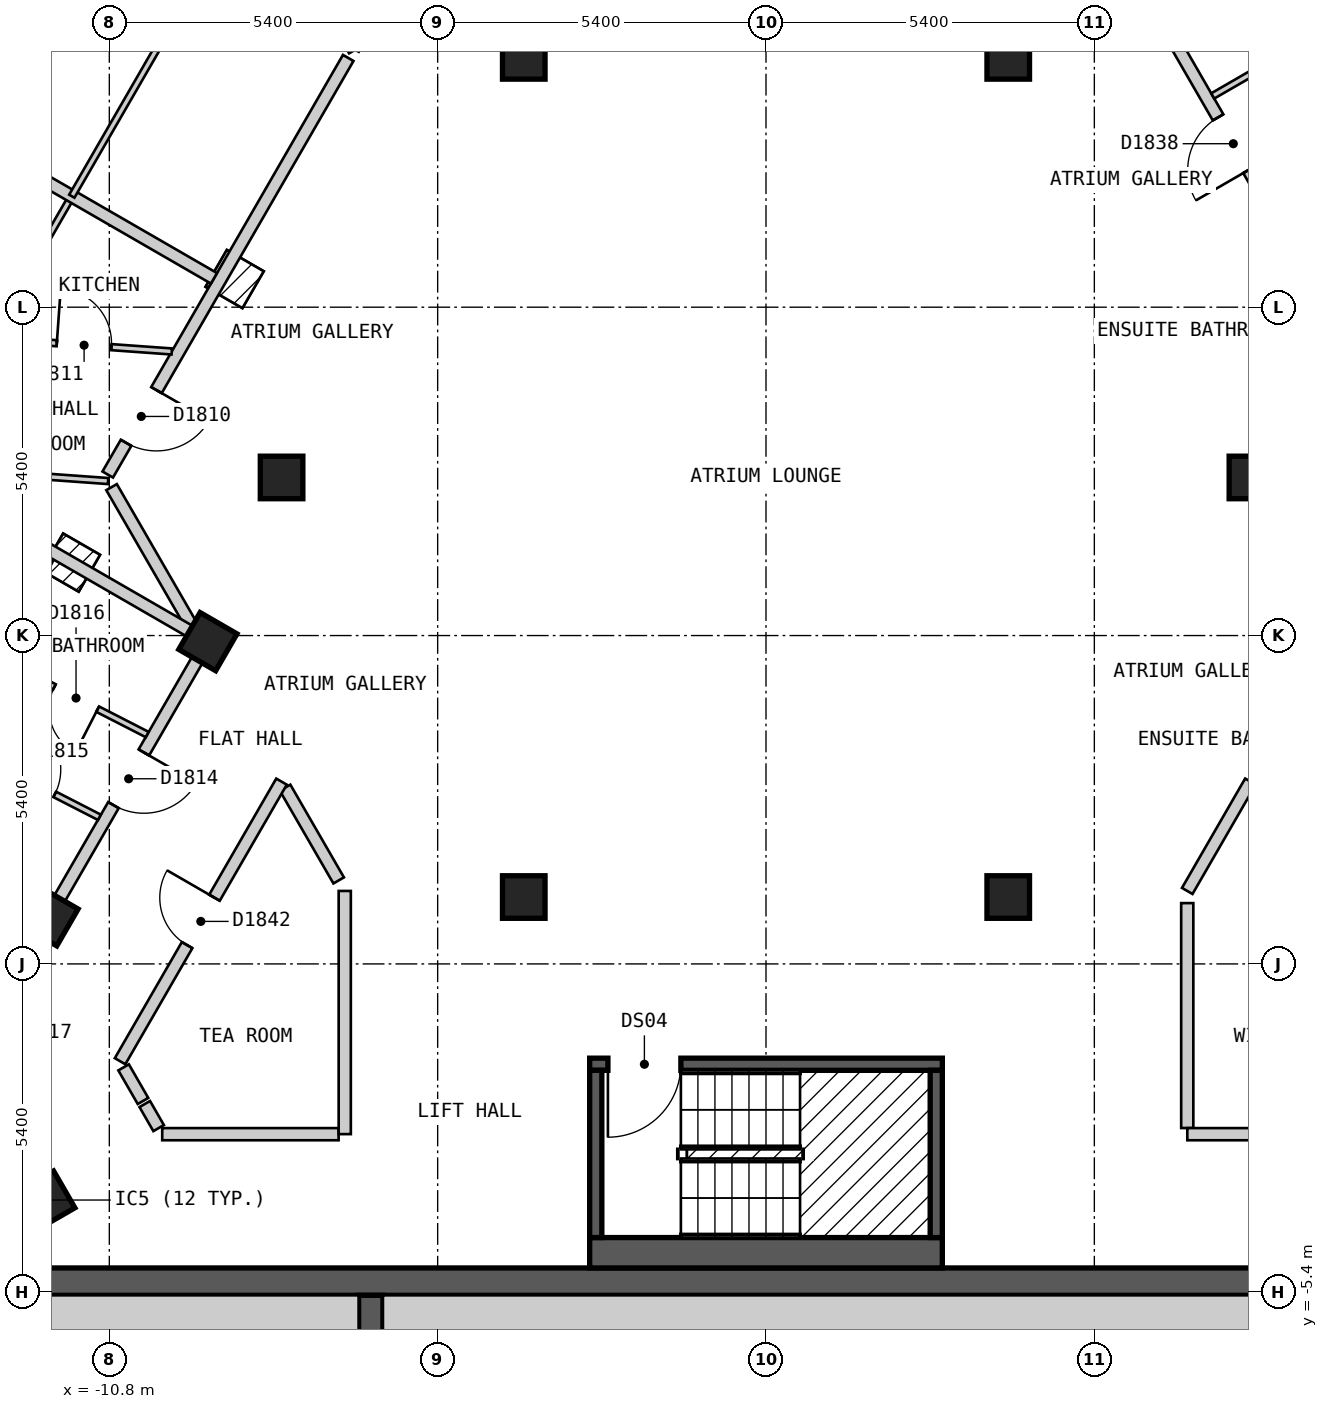
"""IFC4 building model, lengths in metres.
Left out: names, types, materials, properties, quantities, classifications, styles, units other than length and angle.
Written with IfcOpenShell. Run it as: python <this file> out.ifc"""

import sys

from ifc_helpers import new_model, si_unit, direction, frame, frame_2d, origin, origin_2d, place, context, subcontext, project, spatial, rectangle, extrude, element, fill, save


model = new_model("IFC4")
c1 = context("Model", 3, precision=1e-05, world=origin(), true_north=direction((0.0, 1.0)))
c2 = subcontext(c1, "Body", "Model", "MODEL_VIEW")
j1 = project(units=[si_unit("LENGTHUNIT", "METRE"), si_unit("PLANEANGLEUNIT", "RADIAN")], contexts=[c1])
p1 = place(None, origin())
s1 = spatial("IfcSite", under=j1, at=p1, CompositionType="ELEMENT")
p2 = place(p1, origin())
s2 = spatial("IfcBuilding", under=s1, at=p2, CompositionType="ELEMENT")
p3 = place(p2, frame((0.0, 0.0, 202.8)))
s3 = spatial("IfcBuildingStorey", under=s2, at=p3, CompositionType="ELEMENT", Elevation=202.8)
for number, where, z_axis, x_axis in (
    (1, (-11.845, -3.883, 0.0), (0.0, 0.0, 1.0), (0.5, -0.866, 0.0)),
    (2, (3.984, 1.1, 0.0), (0.0, 0.0, 1.0), (1.0, 0.0, 0.0)),
    (3, (7.967, 8.0, 0.0), (0.0, 0.0, 1.0), (1.0, 0.0, 0.0)),
    (4, (3.984, 14.9, 0.0), (0.0, 0.0, 1.0), (1.0, 0.0, 0.0)),
    (5, (-3.984, 14.9, 0.0), (0.0, 0.0, 1.0), (1.0, 0.0, 0.0)),
    (6, (-7.967, 8.0, 0.0), (0.0, 0.0, 1.0), (1.0, 0.0, 0.0)),
    (7, (-9.179, 5.3, 0.0), (0.0, 0.0, 1.0), (-0.5, -0.866, 0.0)),
    (8, (-3.984, 1.1, 0.0), (0.0, 0.0, 1.0), (1.0, 0.0, 0.0)),
    (9, (-11.792, 0.775, 0.0), (0.0, 0.0, 1.0), (-0.5, -0.866, 0.0)),
):
    element("IfcColumn", number, at=place(p3, frame(where, z_axis=z_axis, x_axis=x_axis)), inside=s3, PredefinedType="COLUMN", context=c2, shape_type="SweptSolid", body=[
        extrude(rectangle(XDim=0.7, YDim=0.7, at=origin_2d()), origin(), (0.0, 0.0, 1.0), 3.0),
    ])
p4 = place(p3, frame((-13.3, -5.225, 0.0), z_axis=(0.0, 0.0, 1.0), x_axis=(1.0, 0.0, 0.0)))
e10 = element("IfcWall", 10, at=p4, inside=s3, PredefinedType="SHEAR", context=c2, shape_type="SweptSolid", body=[
    extrude(rectangle(XDim=26.6, YDim=0.45, at=frame_2d((13.3, 0.0))), origin(), (0.0, 0.0, 1.0), 2.7),
])
p5 = place(p4, frame((23.65, 0.0, 0.0)))
e11 = element("IfcOpeningElement", 11, at=p5, cuts=e10, PredefinedType="OPENING", context=c2, shape_type="SweptSolid", body=[
    extrude(rectangle(XDim=1.2, YDim=2.1, at=frame_2d((0.6, 1.05))), frame((0.0, 0.235, 0.0), z_axis=(0.0, -1.0, 0.0), x_axis=(1.0, 0.0, 0.0)), (0.0, 0.0, 1.0), 0.47),
])
p6 = place(p3, frame((-6.5, -9.15, 0.0), z_axis=(0.0, 0.0, 1.0), x_axis=(0.0, 1.0, 0.0)))
e12 = element("IfcWall", 12, at=p6, inside=s3, PredefinedType="SHEAR", context=c2, shape_type="SweptSolid", body=[
    extrude(rectangle(XDim=3.7, YDim=0.4, at=frame_2d((1.85, 0.0))), origin(), (0.0, 0.0, 1.0), 2.7),
])
p7 = place(p3, frame((-2.9, -4.75, 0.0), z_axis=(0.0, 0.0, 1.0), x_axis=(1.0, 0.0, 0.0)))
e13 = element("IfcWall", 13, at=p7, inside=s3, PredefinedType="SOLIDWALL", context=c2, shape_type="SweptSolid", body=[
    extrude(rectangle(XDim=5.8, YDim=0.5, at=frame_2d((2.9, 0.0))), origin(), (0.0, 0.0, 1.0), 2.7),
])
p8 = place(p3, frame((-2.9, -1.65, 0.0), z_axis=(0.0, 0.0, 1.0), x_axis=(1.0, 0.0, 0.0)))
e14 = element("IfcWall", 14, at=p8, inside=s3, PredefinedType="SOLIDWALL", context=c2, shape_type="SweptSolid", body=[
    extrude(rectangle(XDim=5.8, YDim=0.2, at=frame_2d((2.9, 0.0))), origin(), (0.0, 0.0, 1.0), 2.7),
])
p9 = place(p8, frame((0.3, 0.0, 0.0)))
e15 = element("IfcOpeningElement", 15, at=p9, cuts=e14, PredefinedType="OPENING", context=c2, shape_type="SweptSolid", body=[
    extrude(rectangle(XDim=1.2, YDim=2.1, at=frame_2d((0.6, 1.05))), frame((0.0, 0.11, 0.0), z_axis=(0.0, -1.0, 0.0), x_axis=(1.0, 0.0, 0.0)), (0.0, 0.0, 1.0), 0.22),
])
for number, where, z_axis, x_axis in (
    (16, (-2.8, -4.5, 0.0), (0.0, 0.0, 1.0), (0.0, 1.0, 0.0)),
    (17, (2.8, -4.5, 0.0), (0.0, 0.0, 1.0), (0.0, 1.0, 0.0)),
):
    element("IfcWall", number, at=place(p3, frame(where, z_axis=z_axis, x_axis=x_axis)), inside=s3, PredefinedType="SOLIDWALL", context=c2, shape_type="SweptSolid", body=[
        extrude(rectangle(XDim=2.75, YDim=0.2, at=frame_2d((1.375, 0.0))), origin(), (0.0, 0.0, 1.0), 2.7),
    ])
p10 = place(p3, frame((-10.763, 7.841, 0.0), z_axis=(0.0, 0.0, 1.0), x_axis=(0.499980792466, -0.866036492975, 0.0)))
e18 = element("IfcWall", 18, at=p10, inside=s3, PredefinedType="PARTITIONING", context=c2, shape_type="SweptSolid", body=[
    extrude(rectangle(XDim=2.618, YDim=0.2, at=frame_2d((1.309, 0.0))), origin(), (0.0, 0.0, 1.0), 2.7),
])
p11 = place(p3, frame((-7.909, 2.898, 0.0), z_axis=(0.0, 0.0, 1.0), x_axis=(0.50019444547, -0.865913111531, 0.0)))
e19 = element("IfcWall", 19, at=p11, inside=s3, PredefinedType="PARTITIONING", context=c2, shape_type="SweptSolid", body=[
    extrude(rectangle(XDim=1.761, YDim=0.2, at=frame_2d((0.88, 0.0))), origin(), (0.0, 0.0, 1.0), 2.7),
])
p12 = place(p3, frame((-10.565, -1.701, 0.0), z_axis=(0.0, 0.0, 1.0), x_axis=(0.499512735409, -0.866306543416, 0.0)))
e20 = element("IfcWall", 20, at=p12, inside=s3, PredefinedType="PARTITIONING", context=c2, shape_type="SweptSolid", body=[
    extrude(rectangle(XDim=0.638, YDim=0.2, at=frame_2d((0.319, 0.0))), origin(), (0.0, 0.0, 1.0), 2.7),
])
p13 = place(p3, frame((-10.217, -2.304, 0.0), z_axis=(0.0, 0.0, 1.0), x_axis=(0.499013081552, -0.866594452117, 0.0)))
e21 = element("IfcWall", 21, at=p13, inside=s3, PredefinedType="PARTITIONING", context=c2, shape_type="SweptSolid", body=[
    extrude(rectangle(XDim=0.457, YDim=0.2, at=frame_2d((0.229, 0.0))), origin(), (0.0, 0.0, 1.0), 2.7),
])
p14 = place(p3, frame((5.485, 17.3, 0.0), z_axis=(0.0, 0.0, 1.0), x_axis=(0.499943285704, -0.866058145322, 0.0)))
e22 = element("IfcWall", 22, at=p14, inside=s3, PredefinedType="PARTITIONING", context=c2, shape_type="SweptSolid", body=[
    extrude(rectangle(XDim=10.623, YDim=0.2, at=frame_2d((5.312, 0.0))), origin(), (0.0, 0.0, 1.0), 2.7),
])
p15 = place(p14, frame((3.901, 0.0, 0.0)))
e23 = element("IfcOpeningElement", 23, at=p15, cuts=e22, PredefinedType="OPENING", context=c2, shape_type="SweptSolid", body=[
    extrude(rectangle(XDim=1.0, YDim=2.1, at=frame_2d((0.5, 1.05))), frame((0.0, 0.11, 0.0), z_axis=(0.0, -1.0, 0.0), x_axis=(1.0, 0.0, 0.0)), (0.0, 0.0, 1.0), 0.22),
])
p16 = place(p3, frame((6.928, 1.0, 0.0), z_axis=(0.0, 0.0, 1.0), x_axis=(0.0, -1.0, 0.0)))
e24 = element("IfcWall", 24, at=p16, inside=s3, PredefinedType="PARTITIONING", context=c2, shape_type="SweptSolid", body=[
    extrude(rectangle(XDim=3.699, YDim=0.2, at=frame_2d((1.85, 0.0))), origin(), (0.0, 0.0, 1.0), 2.7),
])
p17 = place(p3, frame((-9.93, -2.8, 0.0), z_axis=(0.0, 0.0, 1.0), x_axis=(1.0, 0.0, 0.0)))
e25 = element("IfcWall", 25, at=p17, inside=s3, PredefinedType="PARTITIONING", context=c2, shape_type="SweptSolid", body=[
    extrude(rectangle(XDim=2.901, YDim=0.2, at=frame_2d((1.45, 0.0))), origin(), (0.0, 0.0, 1.0), 2.7),
])
p18 = place(p3, frame((6.929, -2.8, 0.0), z_axis=(0.0, 0.0, 1.0), x_axis=(1.0, 0.0, 0.0)))
e26 = element("IfcWall", 26, at=p18, inside=s3, PredefinedType="PARTITIONING", context=c2, shape_type="SweptSolid", body=[
    extrude(rectangle(XDim=2.885, YDim=0.2, at=frame_2d((1.442, 0.0))), origin(), (0.0, 0.0, 1.0), 2.7),
])
p19 = place(p3, frame((6.928, 1.2, 0.0), z_axis=(0.0, 0.0, 1.0), x_axis=(0.500132712588, 0.865948768577, 0.0)))
e27 = element("IfcWall", 27, at=p19, inside=s3, PredefinedType="PARTITIONING", context=c2, shape_type="SweptSolid", body=[
    extrude(rectangle(XDim=2.078, YDim=0.2, at=frame_2d((1.039, 0.0))), origin(), (0.0, 0.0, 1.0), 2.7),
])
p20 = place(p3, frame((-10.623, -1.6, 0.0), z_axis=(0.0, 0.0, 1.0), x_axis=(0.500040865889, 0.866001808567, 0.0)))
e28 = element("IfcWall", 28, at=p20, inside=s3, PredefinedType="PARTITIONING", context=c2, shape_type="SweptSolid", body=[
    extrude(rectangle(XDim=5.31, YDim=0.2, at=frame_2d((2.655, 0.0))), origin(), (0.0, 0.0, 1.0), 2.7),
])
p21 = place(p20, frame((2.205, 0.0, 0.0)))
e29 = element("IfcOpeningElement", 29, at=p21, cuts=e28, PredefinedType="OPENING", context=c2, shape_type="SweptSolid", body=[
    extrude(rectangle(XDim=0.9, YDim=2.1, at=frame_2d((0.45, 1.05))), frame((0.0, 0.11, 0.0), z_axis=(0.0, -1.0, 0.0), x_axis=(1.0, 0.0, 0.0)), (0.0, 0.0, 1.0), 0.22),
])
p22 = place(p3, frame((-13.106, -1.5, 0.0), z_axis=(0.0, 0.0, 1.0), x_axis=(0.500025705601, 0.86601056214, 0.0)))
e30 = element("IfcWall", 30, at=p22, inside=s3, PredefinedType="PARTITIONING", context=c2, shape_type="SweptSolid", body=[
    extrude(rectangle(XDim=7.735, YDim=0.2, at=frame_2d((3.868, 0.0))), origin(), (0.0, 0.0, 1.0), 2.7),
])
p23 = place(p22, frame((4.748, 0.0, 0.0)))
e31 = element("IfcOpeningElement", 31, at=p23, cuts=e30, PredefinedType="OPENING", context=c2, shape_type="SweptSolid", body=[
    extrude(rectangle(XDim=1.0, YDim=2.1, at=frame_2d((0.5, 1.05))), frame((0.0, 0.11, 0.0), z_axis=(0.0, -1.0, 0.0), x_axis=(1.0, 0.0, 0.0)), (0.0, 0.0, 1.0), 0.22),
])
p24 = place(p22, frame((0.03, 0.0, 0.0)))
e32 = element("IfcOpeningElement", 32, at=p24, cuts=e30, PredefinedType="OPENING", context=c2, shape_type="SweptSolid", body=[
    extrude(rectangle(XDim=0.8, YDim=2.1, at=frame_2d((0.4, 1.05))), frame((0.0, 0.11, 0.0), z_axis=(0.0, -1.0, 0.0), x_axis=(1.0, 0.0, 0.0)), (0.0, 0.0, 1.0), 0.22),
])
p25 = place(p3, frame((-10.826, 8.048, 0.0), z_axis=(0.0, 0.0, 1.0), x_axis=(0.499953104851, 0.866052477019, 0.0)))
e33 = element("IfcWall", 33, at=p25, inside=s3, PredefinedType="PARTITIONING", context=c2, shape_type="SweptSolid", body=[
    extrude(rectangle(XDim=7.91, YDim=0.2, at=frame_2d((3.955, 0.0))), origin(), (0.0, 0.0, 1.0), 2.7),
])
p26 = place(p25, frame((0.603, 0.0, 0.0)))
e34 = element("IfcOpeningElement", 34, at=p26, cuts=e33, PredefinedType="OPENING", context=c2, shape_type="SweptSolid", body=[
    extrude(rectangle(XDim=1.0, YDim=2.1, at=frame_2d((0.5, 1.05))), frame((0.0, 0.11, 0.0), z_axis=(0.0, -1.0, 0.0), x_axis=(1.0, 0.0, 0.0)), (0.0, 0.0, 1.0), 0.22),
])
p27 = place(p3, frame((-6.928, -2.799, 0.0), z_axis=(0.0, 0.0, 1.0), x_axis=(0.0, 1.0, 0.0)))
e35 = element("IfcWall", 35, at=p27, inside=s3, PredefinedType="PARTITIONING", context=c2, shape_type="SweptSolid", body=[
    extrude(rectangle(XDim=3.999, YDim=0.2, at=frame_2d((2.0, 0.0))), origin(), (0.0, 0.0, 1.0), 2.7),
])
p28 = place(p3, frame((-7.628, 16.412, 0.0), z_axis=(0.0, 0.0, 1.0), x_axis=(0.499843439945, -0.866115774908, 0.0)))
e36 = element("IfcWall", 36, at=p28, inside=s3, PredefinedType="PARTITIONING", context=c2, shape_type="SweptSolid", body=[
    extrude(rectangle(XDim=1.63, YDim=0.1, at=frame_2d((0.815, 0.0))), origin(), (0.0, 0.0, 1.0), 2.7),
])
p29 = place(p3, frame((-12.562, 4.995, 0.0), z_axis=(0.0, 0.0, 1.0), x_axis=(0.889807979554, -0.456335139478, 0.0)))
e37 = element("IfcWall", 37, at=p29, inside=s3, PredefinedType="PARTITIONING", context=c2, shape_type="SweptSolid", body=[
    extrude(rectangle(XDim=2.68, YDim=0.1, at=frame_2d((1.34, 0.0))), origin(), (0.0, 0.0, 1.0), 2.7),
])
p30 = place(p29, frame((0.965, 0.0, 0.0)))
e38 = element("IfcOpeningElement", 38, at=p30, cuts=e37, PredefinedType="OPENING", context=c2, shape_type="SweptSolid", body=[
    extrude(rectangle(XDim=0.8, YDim=2.1, at=frame_2d((0.4, 1.05))), frame((0.0, 0.06, 0.0), z_axis=(0.0, -1.0, 0.0), x_axis=(1.0, 0.0, 0.0)), (0.0, 0.0, 1.0), 0.12),
])
p31 = place(p3, frame((-13.277, 3.598, 0.0), z_axis=(0.0, 0.0, 1.0), x_axis=(0.889780322893, -0.456389063182, 0.0)))
e39 = element("IfcWall", 39, at=p31, inside=s3, PredefinedType="PARTITIONING", context=c2, shape_type="SweptSolid", body=[
    extrude(rectangle(XDim=2.601, YDim=0.1, at=frame_2d((1.3, 0.0))), origin(), (0.0, 0.0, 1.0), 2.7),
])
p32 = place(p31, frame((0.875, 0.0, 0.0)))
e40 = element("IfcOpeningElement", 40, at=p32, cuts=e39, PredefinedType="OPENING", context=c2, shape_type="SweptSolid", body=[
    extrude(rectangle(XDim=0.9, YDim=2.1, at=frame_2d((0.45, 1.05))), frame((0.0, 0.06, 0.0), z_axis=(0.0, -1.0, 0.0), x_axis=(1.0, 0.0, 0.0)), (0.0, 0.0, 1.0), 0.12),
])
p33 = place(p3, frame((-13.866, 8.159, 0.0), z_axis=(0.0, 0.0, 1.0), x_axis=(0.9974481372, -0.071394772886, 0.0)))
e41 = element("IfcWall", 41, at=p33, inside=s3, PredefinedType="PARTITIONING", context=c2, shape_type="SweptSolid", body=[
    extrude(rectangle(XDim=3.054, YDim=0.1, at=frame_2d((1.527, 0.0))), origin(), (0.0, 0.0, 1.0), 2.7),
])
p34 = place(p33, frame((1.099, 0.0, 0.0)))
e42 = element("IfcOpeningElement", 42, at=p34, cuts=e41, PredefinedType="OPENING", context=c2, shape_type="SweptSolid", body=[
    extrude(rectangle(XDim=0.8, YDim=2.1, at=frame_2d((0.4, 1.05))), frame((0.0, 0.06, 0.0), z_axis=(0.0, -1.0, 0.0), x_axis=(1.0, 0.0, 0.0)), (0.0, 0.0, 1.0), 0.12),
])
p35 = place(p3, frame((-12.712, 10.282, 0.0), z_axis=(0.0, 0.0, 1.0), x_axis=(0.997457858552, -0.071258826911, 0.0)))
e43 = element("IfcWall", 43, at=p35, inside=s3, PredefinedType="PARTITIONING", context=c2, shape_type="SweptSolid", body=[
    extrude(rectangle(XDim=2.947, YDim=0.1, at=frame_2d((1.473, 0.0))), origin(), (0.0, 0.0, 1.0), 2.7),
])
p36 = place(p35, frame((1.051, 0.0, 0.0)))
e44 = element("IfcOpeningElement", 44, at=p36, cuts=e43, PredefinedType="OPENING", context=c2, shape_type="SweptSolid", body=[
    extrude(rectangle(XDim=0.9, YDim=2.1, at=frame_2d((0.45, 1.05))), frame((0.0, 0.06, 0.0), z_axis=(0.0, -1.0, 0.0), x_axis=(1.0, 0.0, 0.0)), (0.0, 0.0, 1.0), 0.12),
])
p37 = place(p3, frame((-12.778, 10.268, 0.0), z_axis=(0.0, 0.0, 1.0), x_axis=(0.500084799062, 0.865976439487, 0.0)))
e45 = element("IfcWall", 45, at=p37, inside=s3, PredefinedType="PARTITIONING", context=c2, shape_type="SweptSolid", body=[
    extrude(rectangle(XDim=2.722, YDim=0.1, at=frame_2d((1.361, 0.0))), origin(), (0.0, 0.0, 1.0), 2.7),
])
p38 = place(p3, frame((-13.322, 3.622, 0.0), z_axis=(0.0, 0.0, 1.0), x_axis=(0.456157649007, 0.889898982611, 0.0)))
e46 = element("IfcWall", 46, at=p38, inside=s3, PredefinedType="PARTITIONING", context=c2, shape_type="SweptSolid", body=[
    extrude(rectangle(XDim=3.398, YDim=0.1, at=frame_2d((1.699, 0.0))), origin(), (0.0, 0.0, 1.0), 2.7),
])
p39 = place(p3, frame((7.347, 14.274, 0.0), z_axis=(0.0, 0.0, 1.0), x_axis=(0.86601223543, 0.500022807565, 0.0)))
e47 = element("IfcWall", 47, at=p39, inside=s3, PredefinedType="PARTITIONING", context=c2, shape_type="SweptSolid", body=[
    extrude(rectangle(XDim=2.65, YDim=0.1, at=frame_2d((1.325, 0.0))), origin(), (0.0, 0.0, 1.0), 2.7),
])
p40 = place(p39, frame((0.9, 0.0, 0.0)))
e48 = element("IfcOpeningElement", 48, at=p40, cuts=e47, PredefinedType="OPENING", context=c2, shape_type="SweptSolid", body=[
    extrude(rectangle(XDim=0.8, YDim=2.1, at=frame_2d((0.4, 1.05))), frame((0.0, 0.06, 0.0), z_axis=(0.0, -1.0, 0.0), x_axis=(1.0, 0.0, 0.0)), (0.0, 0.0, 1.0), 0.12),
])
p41 = place(p3, frame((-17.926, 10.35, 0.0), z_axis=(0.0, 0.0, 1.0), x_axis=(0.866018411306, -0.500012111133, 0.0)))
e49 = element("IfcWall", 49, at=p41, inside=s3, PredefinedType="PARTITIONING", context=c2, shape_type="SweptSolid", body=[
    extrude(rectangle(XDim=9.898, YDim=0.2, at=frame_2d((4.949, 0.0))), origin(), (0.0, 0.0, 1.0), 2.7),
])
p42 = place(p3, frame((-15.314, 14.875, 0.0), z_axis=(0.0, 0.0, 1.0), x_axis=(0.866001485781, -0.500041424909, 0.0)))
e50 = element("IfcWall", 50, at=p42, inside=s3, PredefinedType="PARTITIONING", context=c2, shape_type="SweptSolid", body=[
    extrude(rectangle(XDim=7.2, YDim=0.2, at=frame_2d((3.6, 0.0))), origin(), (0.0, 0.0, 1.0), 2.7),
])
p43 = place(p3, frame((-11.417, 12.625, 0.0), z_axis=(0.0, 0.0, 1.0), x_axis=(0.500007885066, 0.866020851292, 0.0)))
e51 = element("IfcWall", 51, at=p43, inside=s3, PredefinedType="PARTITIONING", context=c2, shape_type="SweptSolid", body=[
    extrude(rectangle(XDim=7.33, YDim=0.1, at=frame_2d((3.665, 0.0))), origin(), (0.0, 0.0, 1.0), 2.7),
])
p44 = place(p43, frame((3.328, 0.0, 0.0)))
e52 = element("IfcOpeningElement", 52, at=p44, cuts=e51, PredefinedType="OPENING", context=c2, shape_type="SweptSolid", body=[
    extrude(rectangle(XDim=0.8, YDim=2.1, at=frame_2d((0.4, 1.05))), frame((0.0, 0.06, 0.0), z_axis=(0.0, -1.0, 0.0), x_axis=(1.0, 0.0, 0.0)), (0.0, 0.0, 1.0), 0.12),
])
p45 = place(p3, frame((-12.1, -5.825, 0.0), z_axis=(0.0, 0.0, 1.0), x_axis=(1.0, 0.0, 0.0)))
e53 = element("IfcWall", 53, at=p45, inside=s3, PredefinedType="SOLIDWALL", context=c2, shape_type="SweptSolid", body=[
    extrude(rectangle(XDim=5.4, YDim=0.75, at=frame_2d((2.7, 0.0))), origin(), (0.0, 0.0, 1.0), 2.7),
])
p46 = place(p3, frame((-6.3, -5.825, 0.0), z_axis=(0.0, 0.0, 1.0), x_axis=(1.0, 0.0, 0.0)))
e54 = element("IfcWall", 54, at=p46, inside=s3, PredefinedType="SOLIDWALL", context=c2, shape_type="SweptSolid", body=[
    extrude(rectangle(XDim=16.1, YDim=0.75, at=frame_2d((8.05, 0.0))), origin(), (0.0, 0.0, 1.0), 2.7),
])
p47 = place(p9, origin())
e55 = element("IfcDoor", 55, at=p47, inside=s3, OperationType="SINGLE_SWING_LEFT", PredefinedType="DOOR", context=c2, shape_type="SweptSolid", body=[
    extrude(rectangle(XDim=1.2, YDim=2.1, at=frame_2d((0.6, 1.05))), frame((0.0, 0.025, 0.0), z_axis=(0.0, -1.0, 0.0), x_axis=(1.0, 0.0, 0.0)), (0.0, 0.0, 1.0), 0.05),
])
fill(e15, e55)
p48 = place(p26, origin())
e56 = element("IfcDoor", 56, at=p48, inside=s3, OperationType="SINGLE_SWING_RIGHT", PredefinedType="DOOR", context=c2, shape_type="SweptSolid", body=[
    extrude(rectangle(XDim=1.0, YDim=2.1, at=frame_2d((0.5, 1.05))), frame((0.0, 0.025, 0.0), z_axis=(0.0, -1.0, 0.0), x_axis=(1.0, 0.0, 0.0)), (0.0, 0.0, 1.0), 0.05),
])
fill(e34, e56)
p49 = place(p36, origin())
e57 = element("IfcDoor", 57, at=p49, inside=s3, OperationType="SINGLE_SWING_LEFT", PredefinedType="DOOR", context=c2, shape_type="SweptSolid", body=[
    extrude(rectangle(XDim=0.9, YDim=2.1, at=frame_2d((0.45, 1.05))), frame((0.0, 0.025, 0.0), z_axis=(0.0, -1.0, 0.0), x_axis=(1.0, 0.0, 0.0)), (0.0, 0.0, 1.0), 0.05),
])
fill(e44, e57)
p50 = place(p23, origin())
e58 = element("IfcDoor", 58, at=p50, inside=s3, OperationType="SINGLE_SWING_RIGHT", PredefinedType="DOOR", context=c2, shape_type="SweptSolid", body=[
    extrude(rectangle(XDim=1.0, YDim=2.1, at=frame_2d((0.5, 1.05))), frame((0.0, 0.025, 0.0), z_axis=(0.0, -1.0, 0.0), x_axis=(1.0, 0.0, 0.0)), (0.0, 0.0, 1.0), 0.05),
])
fill(e31, e58)
p51 = place(p32, origin())
e59 = element("IfcDoor", 59, at=p51, inside=s3, OperationType="SINGLE_SWING_LEFT", PredefinedType="DOOR", context=c2, shape_type="SweptSolid", body=[
    extrude(rectangle(XDim=0.9, YDim=2.1, at=frame_2d((0.45, 1.05))), frame((0.0, 0.025, 0.0), z_axis=(0.0, -1.0, 0.0), x_axis=(1.0, 0.0, 0.0)), (0.0, 0.0, 1.0), 0.05),
])
fill(e40, e59)
p52 = place(p30, origin())
e60 = element("IfcDoor", 60, at=p52, inside=s3, OperationType="SINGLE_SWING_RIGHT", PredefinedType="DOOR", context=c2, shape_type="SweptSolid", body=[
    extrude(rectangle(XDim=0.8, YDim=2.1, at=frame_2d((0.4, 1.05))), frame((0.0, 0.025, 0.0), z_axis=(0.0, -1.0, 0.0), x_axis=(1.0, 0.0, 0.0)), (0.0, 0.0, 1.0), 0.05),
])
fill(e38, e60)
p53 = place(p15, origin())
e61 = element("IfcDoor", 61, at=p53, inside=s3, OperationType="SINGLE_SWING_RIGHT", PredefinedType="DOOR", context=c2, shape_type="SweptSolid", body=[
    extrude(rectangle(XDim=1.0, YDim=2.1, at=frame_2d((0.5, 1.05))), frame((0.0, 0.025, 0.0), z_axis=(0.0, -1.0, 0.0), x_axis=(1.0, 0.0, 0.0)), (0.0, 0.0, 1.0), 0.05),
])
fill(e23, e61)
p54 = place(p21, origin())
e62 = element("IfcDoor", 62, at=p54, inside=s3, OperationType="SINGLE_SWING_RIGHT", PredefinedType="DOOR", context=c2, shape_type="SweptSolid", body=[
    extrude(rectangle(XDim=0.9, YDim=2.1, at=frame_2d((0.45, 1.05))), frame((0.0, 0.025, 0.0), z_axis=(0.0, -1.0, 0.0), x_axis=(1.0, 0.0, 0.0)), (0.0, 0.0, 1.0), 0.05),
])
fill(e29, e62)
save(model, sys.argv[1])
